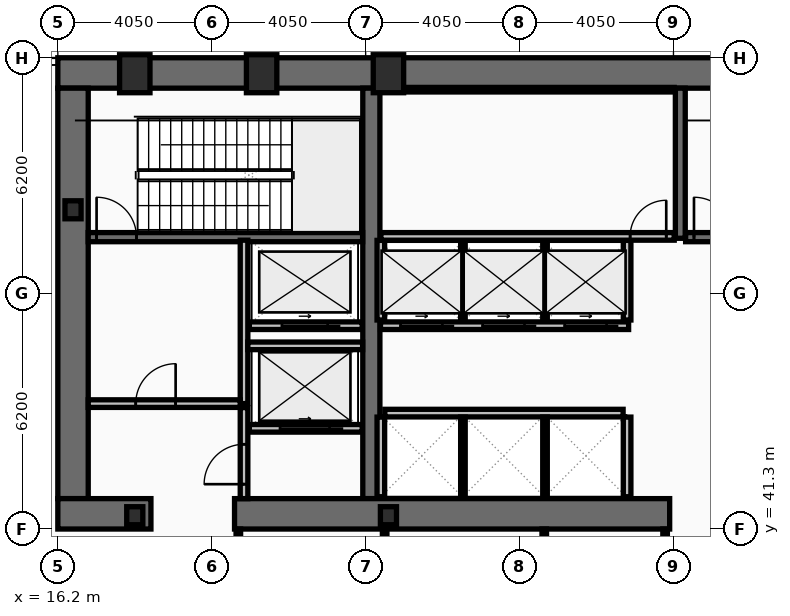
"""IFC4 building model, lengths in metres.
Left out: names, types, materials, properties, quantities, classifications, styles, units other than length and angle.
Written with IfcOpenShell. Run it as: python <this file> out.ifc"""

import sys

from ifc_helpers import new_model, si_unit, direction, frame, frame_2d, origin, origin_2d, place, context, subcontext, project, spatial, rectangle, hollow_rectangle, i_section, extrude, element, fill, save


model = new_model("IFC4")
c1 = context("Model", 3, precision=1e-05, world=origin(), true_north=direction((0.0, 1.0)))
c2 = subcontext(c1, "Body", "Model", "MODEL_VIEW")
j1 = project(units=[si_unit("LENGTHUNIT", "METRE"), si_unit("PLANEANGLEUNIT", "RADIAN")], contexts=[c1])
p1 = place(None, origin())
s1 = spatial("IfcSite", under=j1, at=p1, CompositionType="ELEMENT")
p2 = place(p1, origin())
s2 = spatial("IfcBuilding", under=s1, at=p2, CompositionType="ELEMENT")
p3 = place(p2, frame((0.0, 0.0, 15.4)))
s3 = spatial("IfcBuildingStorey", under=s2, at=p3, CompositionType="ELEMENT", Elevation=15.4)
p4 = place(p3, frame((16.2, 53.3, 0.0), z_axis=(0.0, 0.0, 1.0), x_axis=(1.0, 0.0, 0.0)))
e1 = element("IfcWall", 1, at=p4, inside=s3, PredefinedType="SHEAR", context=c2, shape_type="SweptSolid", body=[
    extrude(rectangle(XDim=40.5, YDim=0.8, at=frame_2d((20.25, 0.0))), origin(), (0.0, 0.0, 1.0), 4.78),
])
p5 = place(p3, frame((16.6, 42.1, 0.0), z_axis=(0.0, 0.0, 1.0), x_axis=(0.0, 1.0, 0.0)))
e2 = element("IfcWall", 2, at=p5, inside=s3, PredefinedType="SHEAR", context=c2, shape_type="SweptSolid", body=[
    extrude(rectangle(XDim=10.8, YDim=0.8, at=frame_2d((5.4, 0.0))), origin(), (0.0, 0.0, 1.0), 4.78),
])
p6 = place(p3, frame((24.45, 42.1, 0.0), z_axis=(0.0, 0.0, 1.0), x_axis=(0.0, 1.0, 0.0)))
e3 = element("IfcWall", 3, at=p6, inside=s3, PredefinedType="SHEAR", context=c2, shape_type="SweptSolid", body=[
    extrude(rectangle(XDim=10.8, YDim=0.45, at=frame_2d((5.4, 0.0))), origin(), (0.0, 0.0, 1.0), 4.78),
])
p7 = place(p3, frame((18.65, 41.7, 0.0), z_axis=(0.0, 0.0, 1.0), x_axis=(-1.0, 0.0, 0.0)))
e4 = element("IfcWall", 4, at=p7, inside=s3, PredefinedType="SHEAR", context=c2, shape_type="SweptSolid", body=[
    extrude(rectangle(XDim=2.45, YDim=0.8, at=frame_2d((1.225, 0.0))), origin(), (0.0, 0.0, 1.0), 4.78),
])
p8 = place(p3, frame((32.3, 41.7, 0.0), z_axis=(0.0, 0.0, 1.0), x_axis=(-1.0, 0.0, 0.0)))
e5 = element("IfcWall", 5, at=p8, inside=s3, PredefinedType="SHEAR", context=c2, shape_type="SweptSolid", body=[
    extrude(rectangle(XDim=11.45, YDim=0.8, at=frame_2d((5.725, 0.0))), origin(), (0.0, 0.0, 1.0), 4.78),
])
p9 = place(p3, frame((32.58, 48.95, 0.0), z_axis=(0.0, 0.0, 1.0), x_axis=(0.0, 1.0, 0.0)))
e6 = element("IfcWall", 6, at=p9, inside=s3, PredefinedType="SHEAR", context=c2, shape_type="SweptSolid", body=[
    extrude(rectangle(XDim=3.95, YDim=0.26, at=frame_2d((1.975, 0.0))), origin(), (0.0, 0.0, 1.0), 4.78),
])
p10 = place(p3, frame((17.0, 48.98, 0.0), z_axis=(0.0, 0.0, 1.0), x_axis=(1.0, 0.0, 0.0)))
e7 = element("IfcWall", 7, at=p10, inside=s3, PredefinedType="SHEAR", context=c2, shape_type="SweptSolid", body=[
    extrude(rectangle(XDim=7.22, YDim=0.24, at=frame_2d((3.61, 0.0))), origin(), (0.0, 0.0, 1.0), 4.78),
])
p11 = place(p10, frame((0.22, 0.0, 0.0)))
e8 = element("IfcOpeningElement", 8, at=p11, cuts=e7, PredefinedType="OPENING", context=c2, shape_type="SweptSolid", body=[
    extrude(rectangle(XDim=1.05, YDim=2.15, at=frame_2d((0.525, 1.075))), frame((0.0, 0.13, 0.0), z_axis=(0.0, -1.0, 0.0), x_axis=(1.0, 0.0, 0.0)), (0.0, 0.0, 1.0), 0.26),
])
p12 = place(p3, frame((32.72, 48.98, 0.0), z_axis=(0.0, 0.0, 1.0), x_axis=(1.0, 0.0, 0.0)))
e9 = element("IfcWall", 9, at=p12, inside=s3, PredefinedType="SHEAR", context=c2, shape_type="SweptSolid", body=[
    extrude(rectangle(XDim=7.56, YDim=0.24, at=frame_2d((3.78, 0.0))), origin(), (0.0, 0.0, 1.0), 4.78),
])
p13 = place(p12, frame((0.22, 0.0, 0.0)))
e10 = element("IfcOpeningElement", 10, at=p13, cuts=e9, PredefinedType="OPENING", context=c2, shape_type="SweptSolid", body=[
    extrude(rectangle(XDim=1.05, YDim=2.15, at=frame_2d((0.525, 1.075))), frame((0.0, 0.13, 0.0), z_axis=(0.0, -1.0, 0.0), x_axis=(1.0, 0.0, 0.0)), (0.0, 0.0, 1.0), 0.26),
])
for number, where, z_axis, x_axis in (
    (11, (18.225, 53.28, 0.0), (0.0, 0.0, 1.0), (1.0, 0.0, 0.0)),
    (12, (21.562, 53.28, 0.0), (0.0, 0.0, 1.0), (1.0, 0.0, 0.0)),
    (13, (24.9, 53.28, 0.0), (0.0, 0.0, 1.0), (1.0, 0.0, 0.0)),
):
    element("IfcColumn", number, at=place(p3, frame(where, z_axis=z_axis, x_axis=x_axis)), inside=s3, PredefinedType="COLUMN", context=c2, shape_type="SweptSolid", body=[
        extrude(hollow_rectangle(XDim=0.8, YDim=1.0, WallThickness=0.055, at=origin_2d()), origin(), (0.0, 0.0, 1.0), 5.0),
    ])
for number, where, z_axis, x_axis in (
    (14, (16.6, 49.7, 0.0), (0.0, 0.0, 1.0), (1.0, 0.0, 0.0)),
    (15, (18.225, 41.65, 0.0), (0.0, 0.0, 1.0), (1.0, 0.0, 0.0)),
    (16, (24.9, 41.65, 0.0), (0.0, 0.0, 1.0), (1.0, 0.0, 0.0)),
):
    element("IfcColumn", number, at=place(p3, frame(where, z_axis=z_axis, x_axis=x_axis)), inside=s3, PredefinedType="COLUMN", context=c2, shape_type="SweptSolid", body=[
        extrude(i_section(OverallWidth=0.424, OverallDepth=0.474, WebThickness=0.048, FlangeThickness=0.077, at=origin_2d()), origin(), (0.0, 0.0, 1.0), 5.0),
    ])
p14 = place(p3, frame((24.21, 43.95, 0.0), z_axis=(0.0, 0.0, 1.0), x_axis=(-1.0, 0.0, 0.0)))
e17 = element("IfcWall", 17, at=p14, inside=s3, PredefinedType="PARTITIONING", context=c2, shape_type="SweptSolid", body=[
    extrude(rectangle(XDim=2.97, YDim=0.2, at=frame_2d((1.485, 0.0))), origin(), (0.0, 0.0, 1.0), 4.78),
])
p15 = place(p14, frame((0.86, 0.0, 0.0)))
e18 = element("IfcOpeningElement", 18, at=p15, cuts=e17, PredefinedType="OPENING", context=c2, shape_type="SweptSolid", body=[
    extrude(rectangle(XDim=1.3, YDim=2.18, at=frame_2d((0.65, 1.09))), frame((0.0, 0.11, 0.0), z_axis=(0.0, -1.0, 0.0), x_axis=(1.0, 0.0, 0.0)), (0.0, 0.0, 1.0), 0.22),
])
p16 = place(p3, frame((24.21, 46.65, 0.0), z_axis=(0.0, 0.0, 1.0), x_axis=(-1.0, 0.0, 0.0)))
e19 = element("IfcWall", 19, at=p16, inside=s3, PredefinedType="PARTITIONING", context=c2, shape_type="SweptSolid", body=[
    extrude(rectangle(XDim=2.97, YDim=0.2, at=frame_2d((1.485, 0.0))), origin(), (0.0, 0.0, 1.0), 4.78),
])
p17 = place(p16, frame((0.91, 0.0, 0.0)))
e20 = element("IfcOpeningElement", 20, at=p17, cuts=e19, PredefinedType="OPENING", context=c2, shape_type="SweptSolid", body=[
    extrude(rectangle(XDim=1.2, YDim=2.18, at=frame_2d((0.6, 1.09))), frame((0.0, 0.11, 0.0), z_axis=(0.0, -1.0, 0.0), x_axis=(1.0, 0.0, 0.0)), (0.0, 0.0, 1.0), 0.22),
])
p18 = place(p3, frame((31.22, 46.65, 0.0), z_axis=(0.0, 0.0, 1.0), x_axis=(-1.0, 0.0, 0.0)))
e21 = element("IfcWall", 21, at=p18, inside=s3, PredefinedType="PARTITIONING", context=c2, shape_type="SweptSolid", body=[
    extrude(rectangle(XDim=6.53, YDim=0.2, at=frame_2d((3.265, 0.0))), origin(), (0.0, 0.0, 1.0), 4.78),
])
p19 = place(p18, frame((4.9, 0.0, 0.0)))
e22 = element("IfcOpeningElement", 22, at=p19, cuts=e21, PredefinedType="OPENING", context=c2, shape_type="SweptSolid", body=[
    extrude(rectangle(XDim=1.1, YDim=2.18, at=frame_2d((0.55, 1.09))), frame((0.0, 0.11, 0.0), z_axis=(0.0, -1.0, 0.0), x_axis=(1.0, 0.0, 0.0)), (0.0, 0.0, 1.0), 0.22),
])
p20 = place(p18, frame((2.74, 0.0, 0.0)))
e23 = element("IfcOpeningElement", 23, at=p20, cuts=e21, PredefinedType="OPENING", context=c2, shape_type="SweptSolid", body=[
    extrude(rectangle(XDim=1.1, YDim=2.18, at=frame_2d((0.55, 1.09))), frame((0.0, 0.11, 0.0), z_axis=(0.0, -1.0, 0.0), x_axis=(1.0, 0.0, 0.0)), (0.0, 0.0, 1.0), 0.22),
])
p21 = place(p18, frame((0.58, 0.0, 0.0)))
e24 = element("IfcOpeningElement", 24, at=p21, cuts=e21, PredefinedType="OPENING", context=c2, shape_type="SweptSolid", body=[
    extrude(rectangle(XDim=1.1, YDim=2.18, at=frame_2d((0.55, 1.09))), frame((0.0, 0.11, 0.0), z_axis=(0.0, -1.0, 0.0), x_axis=(1.0, 0.0, 0.0)), (0.0, 0.0, 1.0), 0.22),
])
p22 = place(p3, frame((21.1, 44.6, 0.0), z_axis=(0.0, 0.0, 1.0), x_axis=(0.0, 1.0, 0.0)))
e25 = element("IfcWall", 25, at=p22, inside=s3, PredefinedType="PARTITIONING", context=c2, shape_type="SweptSolid", body=[
    extrude(rectangle(XDim=4.3, YDim=0.2, at=frame_2d((2.15, 0.0))), origin(), (0.0, 0.0, 1.0), 4.78),
])
p23 = place(p3, frame((17.0, 44.6, 0.0), z_axis=(0.0, 0.0, 1.0), x_axis=(1.0, 0.0, 0.0)))
e26 = element("IfcWall", 26, at=p23, inside=s3, PredefinedType="PARTITIONING", context=c2, shape_type="SweptSolid", body=[
    extrude(rectangle(XDim=4.0, YDim=0.2, at=frame_2d((2.0, 0.0))), origin(), (0.0, 0.0, 1.0), 4.78),
])
p24 = place(p23, frame((1.25, 0.0, 0.0)))
e27 = element("IfcOpeningElement", 27, at=p24, cuts=e26, PredefinedType="OPENING", context=c2, shape_type="SweptSolid", body=[
    extrude(rectangle(XDim=1.05, YDim=2.15, at=frame_2d((0.525, 1.075))), frame((0.0, 0.11, 0.0), z_axis=(0.0, -1.0, 0.0), x_axis=(1.0, 0.0, 0.0)), (0.0, 0.0, 1.0), 0.22),
])
p25 = place(p3, frame((21.2, 46.12, 0.0), z_axis=(0.0, 0.0, 1.0), x_axis=(1.0, 0.0, 0.0)))
e28 = element("IfcWall", 28, at=p25, inside=s3, PredefinedType="PARTITIONING", context=c2, shape_type="SweptSolid", body=[
    extrude(rectangle(XDim=3.02, YDim=0.2, at=frame_2d((1.51, 0.0))), origin(), (0.0, 0.0, 1.0), 4.78),
])
p26 = place(p3, frame((21.1, 42.1, 0.0), z_axis=(0.0, 0.0, 1.0), x_axis=(0.0, 1.0, 0.0)))
e29 = element("IfcWall", 29, at=p26, inside=s3, PredefinedType="PARTITIONING", context=c2, shape_type="SweptSolid", body=[
    extrude(rectangle(XDim=2.395, YDim=0.2, at=frame_2d((1.198, 0.0))), origin(), (0.0, 0.0, 1.0), 4.78),
])
p27 = place(p26, frame((0.38, 0.0, 0.0)))
e30 = element("IfcOpeningElement", 30, at=p27, cuts=e29, PredefinedType="OPENING", context=c2, shape_type="SweptSolid", body=[
    extrude(rectangle(XDim=1.05, YDim=2.15, at=frame_2d((0.525, 1.075))), frame((0.0, 0.11, 0.0), z_axis=(0.0, -1.0, 0.0), x_axis=(1.0, 0.0, 0.0)), (0.0, 0.0, 1.0), 0.22),
])
for number, where, z_axis, x_axis in (
    (31, (24.7, 46.8, 0.0), (0.0, 0.0, 1.0), (0.0, 1.0, 0.0)),
    (32, (31.18, 46.8, 0.0), (0.0, 0.0, 1.0), (0.0, 1.0, 0.0)),
):
    element("IfcWall", number, at=place(p3, frame(where, z_axis=z_axis, x_axis=x_axis)), inside=s3, PredefinedType="PARTITIONING", context=c2, shape_type="SweptSolid", body=[
        extrude(rectangle(XDim=2.095, YDim=0.2, at=frame_2d((1.047, 0.0))), origin(), (0.0, 0.0, 1.0), 4.78),
    ])
for number, where, z_axis, x_axis in (
    (33, (26.86, 46.8, 0.0), (0.0, 0.0, 1.0), (0.0, 1.0, 0.0)),
    (34, (29.02, 46.8, 0.0), (0.0, 0.0, 1.0), (0.0, 1.0, 0.0)),
):
    element("IfcWall", number, at=place(p3, frame(where, z_axis=z_axis, x_axis=x_axis)), inside=s3, PredefinedType="PARTITIONING", context=c2, shape_type="SweptSolid", body=[
        extrude(rectangle(XDim=2.095, YDim=0.12, at=frame_2d((1.047, 0.0))), origin(), (0.0, 0.0, 1.0), 4.78),
    ])
p28 = place(p3, frame((24.805, 44.35, 0.0), z_axis=(0.0, 0.0, 1.0), x_axis=(1.0, 0.0, 0.0)))
e35 = element("IfcWall", 35, at=p28, inside=s3, PredefinedType="PARTITIONING", context=c2, shape_type="SweptSolid", body=[
    extrude(rectangle(XDim=6.27, YDim=0.2, at=frame_2d((3.135, 0.0))), origin(), (0.0, 0.0, 1.0), 4.78),
])
for number, where, z_axis, x_axis in (
    (36, (24.7, 42.15, 0.0), (0.0, 0.0, 1.0), (0.0, 1.0, 0.0)),
    (37, (31.18, 42.15, 0.0), (0.0, 0.0, 1.0), (0.0, 1.0, 0.0)),
):
    element("IfcWall", number, at=place(p3, frame(where, z_axis=z_axis, x_axis=x_axis)), inside=s3, PredefinedType="PARTITIONING", context=c2, shape_type="SweptSolid", body=[
        extrude(rectangle(XDim=2.095, YDim=0.2, at=frame_2d((1.048, 0.0))), origin(), (0.0, 0.0, 1.0), 4.78),
    ])
for number, where, z_axis, x_axis in (
    (38, (26.86, 42.15, 0.0), (0.0, 0.0, 1.0), (0.0, 1.0, 0.0)),
    (39, (29.02, 42.15, 0.0), (0.0, 0.0, 1.0), (0.0, 1.0, 0.0)),
):
    element("IfcWall", number, at=place(p3, frame(where, z_axis=z_axis, x_axis=x_axis)), inside=s3, PredefinedType="PARTITIONING", context=c2, shape_type="SweptSolid", body=[
        extrude(rectangle(XDim=2.095, YDim=0.12, at=frame_2d((1.048, 0.0))), origin(), (0.0, 0.0, 1.0), 4.78),
    ])
p29 = place(p3, frame((24.7, 52.86, 0.0), z_axis=(0.0, 0.0, 1.0), x_axis=(1.0, 0.0, 0.0)))
e40 = element("IfcWall", 40, at=p29, inside=s3, PredefinedType="PARTITIONING", context=c2, shape_type="SweptSolid", body=[
    extrude(rectangle(XDim=7.72, YDim=0.12, at=frame_2d((3.86, 0.0))), origin(), (0.0, 0.0, 1.0), 4.78),
])
p30 = place(p3, frame((24.7, 49.0, 0.0), z_axis=(0.0, 0.0, 1.0), x_axis=(1.0, 0.0, 0.0)))
e41 = element("IfcWall", 41, at=p30, inside=s3, PredefinedType="PARTITIONING", context=c2, shape_type="SweptSolid", body=[
    extrude(rectangle(XDim=7.72, YDim=0.2, at=frame_2d((3.86, 0.0))), origin(), (0.0, 0.0, 1.0), 4.78),
])
p31 = place(p30, frame((6.56, 0.0, 0.0)))
e42 = element("IfcOpeningElement", 42, at=p31, cuts=e41, PredefinedType="OPENING", context=c2, shape_type="SweptSolid", body=[
    extrude(rectangle(XDim=0.95, YDim=2.1, at=frame_2d((0.475, 1.05))), frame((0.0, 0.11, 0.0), z_axis=(0.0, -1.0, 0.0), x_axis=(1.0, 0.0, 0.0)), (0.0, 0.0, 1.0), 0.22),
])
p32 = place(p3, frame((20.95, 38.28, 0.0), z_axis=(0.0, 0.0, 1.0), x_axis=(0.0, 1.0, 0.0)))
e43 = element("IfcWall", 43, at=p32, inside=s3, PredefinedType="PARTITIONING", context=c2, shape_type="SweptSolid", body=[
    extrude(rectangle(XDim=3.02, YDim=0.12, at=frame_2d((1.51, 0.0))), origin(), (0.0, 0.0, 1.0), 4.78),
])
p33 = place(p3, frame((24.8, 38.28, 0.0), z_axis=(0.0, 0.0, 1.0), x_axis=(0.0, 1.0, 0.0)))
e44 = element("IfcWall", 44, at=p33, inside=s3, PredefinedType="PARTITIONING", context=c2, shape_type="SweptSolid", body=[
    extrude(rectangle(XDim=3.02, YDim=0.12, at=frame_2d((1.51, 0.0))), origin(), (0.0, 0.0, 1.0), 3.87),
])
for number, where, z_axis, x_axis in (
    (45, (29.0, 38.28, 0.0), (0.0, 0.0, 1.0), (0.0, 1.0, 0.0)),
    (46, (32.18, 38.28, 0.0), (0.0, 0.0, 1.0), (0.0, 1.0, 0.0)),
):
    element("IfcWall", number, at=place(p3, frame(where, z_axis=z_axis, x_axis=x_axis)), inside=s3, PredefinedType="PARTITIONING", context=c2, shape_type="SweptSolid", body=[
        extrude(rectangle(XDim=3.02, YDim=0.12, at=frame_2d((1.51, 0.0))), origin(), (0.0, 0.0, 1.0), 4.78),
    ])
p34 = place(p11, origin())
e47 = element("IfcDoor", 47, at=p34, inside=s3, OperationType="SINGLE_SWING_LEFT", PredefinedType="DOOR", context=c2, shape_type="SweptSolid", body=[
    extrude(rectangle(XDim=1.05, YDim=2.15, at=frame_2d((0.525, 1.075))), frame((0.0, 0.025, 0.0), z_axis=(0.0, -1.0, 0.0), x_axis=(1.0, 0.0, 0.0)), (0.0, 0.0, 1.0), 0.05),
])
fill(e8, e47)
p35 = place(p13, origin())
e48 = element("IfcDoor", 48, at=p35, inside=s3, OperationType="SINGLE_SWING_LEFT", PredefinedType="DOOR", context=c2, shape_type="SweptSolid", body=[
    extrude(rectangle(XDim=1.05, YDim=2.15, at=frame_2d((0.525, 1.075))), frame((0.0, 0.025, 0.0), z_axis=(0.0, -1.0, 0.0), x_axis=(1.0, 0.0, 0.0)), (0.0, 0.0, 1.0), 0.05),
])
fill(e10, e48)
p36 = place(p15, origin())
e49 = element("IfcDoor", 49, at=p36, inside=s3, OperationType="SLIDING_TO_LEFT", PredefinedType="DOOR", context=c2, shape_type="SweptSolid", body=[
    extrude(rectangle(XDim=1.3, YDim=2.18, at=frame_2d((0.65, 1.09))), frame((0.0, 0.025, 0.0), z_axis=(0.0, -1.0, 0.0), x_axis=(1.0, 0.0, 0.0)), (0.0, 0.0, 1.0), 0.05),
])
fill(e18, e49)
p37 = place(p17, origin())
e50 = element("IfcDoor", 50, at=p37, inside=s3, OperationType="SLIDING_TO_LEFT", PredefinedType="DOOR", context=c2, shape_type="SweptSolid", body=[
    extrude(rectangle(XDim=1.2, YDim=2.18, at=frame_2d((0.6, 1.09))), frame((0.0, 0.025, 0.0), z_axis=(0.0, -1.0, 0.0), x_axis=(1.0, 0.0, 0.0)), (0.0, 0.0, 1.0), 0.05),
])
fill(e20, e50)
p38 = place(p19, origin())
e51 = element("IfcDoor", 51, at=p38, inside=s3, OperationType="SLIDING_TO_LEFT", PredefinedType="DOOR", context=c2, shape_type="SweptSolid", body=[
    extrude(rectangle(XDim=1.1, YDim=2.18, at=frame_2d((0.55, 1.09))), frame((0.0, 0.025, 0.0), z_axis=(0.0, -1.0, 0.0), x_axis=(1.0, 0.0, 0.0)), (0.0, 0.0, 1.0), 0.05),
])
fill(e22, e51)
p39 = place(p20, origin())
e52 = element("IfcDoor", 52, at=p39, inside=s3, OperationType="SLIDING_TO_LEFT", PredefinedType="DOOR", context=c2, shape_type="SweptSolid", body=[
    extrude(rectangle(XDim=1.1, YDim=2.18, at=frame_2d((0.55, 1.09))), frame((0.0, 0.025, 0.0), z_axis=(0.0, -1.0, 0.0), x_axis=(1.0, 0.0, 0.0)), (0.0, 0.0, 1.0), 0.05),
])
fill(e23, e52)
p40 = place(p21, origin())
e53 = element("IfcDoor", 53, at=p40, inside=s3, OperationType="SLIDING_TO_LEFT", PredefinedType="DOOR", context=c2, shape_type="SweptSolid", body=[
    extrude(rectangle(XDim=1.1, YDim=2.18, at=frame_2d((0.55, 1.09))), frame((0.0, 0.025, 0.0), z_axis=(0.0, -1.0, 0.0), x_axis=(1.0, 0.0, 0.0)), (0.0, 0.0, 1.0), 0.05),
])
fill(e24, e53)
p41 = place(p24, origin())
e54 = element("IfcDoor", 54, at=p41, inside=s3, OperationType="SINGLE_SWING_RIGHT", PredefinedType="DOOR", context=c2, shape_type="SweptSolid", body=[
    extrude(rectangle(XDim=1.05, YDim=2.15, at=frame_2d((0.525, 1.075))), frame((0.0, 0.025, 0.0), z_axis=(0.0, -1.0, 0.0), x_axis=(1.0, 0.0, 0.0)), (0.0, 0.0, 1.0), 0.05),
])
fill(e27, e54)
p42 = place(p27, origin())
e55 = element("IfcDoor", 55, at=p42, inside=s3, OperationType="SINGLE_SWING_LEFT", PredefinedType="DOOR", context=c2, shape_type="SweptSolid", body=[
    extrude(rectangle(XDim=1.05, YDim=2.15, at=frame_2d((0.525, 1.075))), frame((0.0, 0.025, 0.0), z_axis=(0.0, -1.0, 0.0), x_axis=(1.0, 0.0, 0.0)), (0.0, 0.0, 1.0), 0.05),
])
fill(e30, e55)
p43 = place(p31, origin())
e56 = element("IfcDoor", 56, at=p43, inside=s3, OperationType="SINGLE_SWING_RIGHT", PredefinedType="DOOR", context=c2, shape_type="SweptSolid", body=[
    extrude(rectangle(XDim=0.95, YDim=2.1, at=frame_2d((0.475, 1.05))), frame((0.0, 0.025, 0.0), z_axis=(0.0, -1.0, 0.0), x_axis=(1.0, 0.0, 0.0)), (0.0, 0.0, 1.0), 0.05),
])
fill(e42, e56)
save(model, sys.argv[1])
